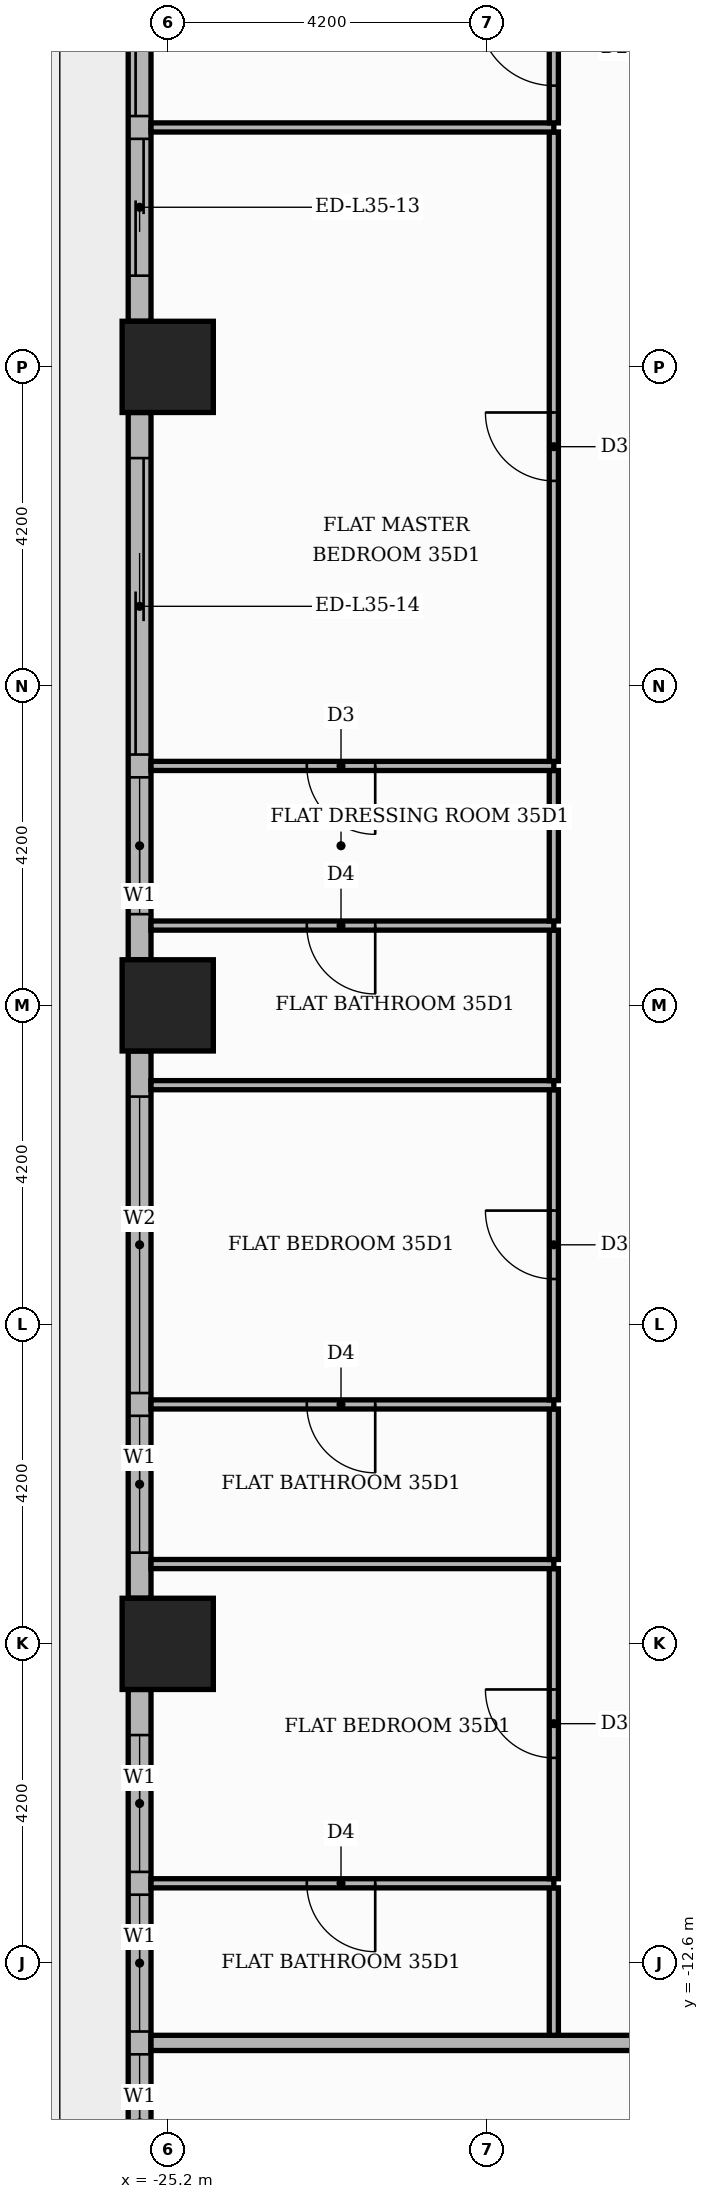
"""IFC4 building model, lengths in metres.
Left out: names, types, materials, properties, quantities, classifications, styles, units other than length and angle.
Written with IfcOpenShell. Run it as: python <this file> out.ifc"""

import sys

from ifc_helpers import new_model, si_unit, direction, frame, frame_2d, origin, origin_2d, place, context, subcontext, project, spatial, rectangle, extrude, element, fill, save


model = new_model("IFC4")
c1 = context("Model", 3, precision=1e-05, world=origin(), true_north=direction((0.0, 1.0)))
c2 = subcontext(c1, "Body", "Model", "MODEL_VIEW")
j1 = project(units=[si_unit("LENGTHUNIT", "METRE"), si_unit("PLANEANGLEUNIT", "RADIAN")], contexts=[c1])
p1 = place(None, origin())
s1 = spatial("IfcSite", under=j1, at=p1, CompositionType="ELEMENT")
p2 = place(p1, origin())
s2 = spatial("IfcBuilding", under=s1, at=p2, CompositionType="ELEMENT")
p3 = place(p2, frame((0.0, 0.0, 149.4)))
s3 = spatial("IfcBuildingStorey", under=s2, at=p3, CompositionType="ELEMENT", Elevation=149.4)
for number, where, z_axis, x_axis in (
    (1, (-25.2, 0.0, 0.0), (0.0, 0.0, 1.0), (1.0, 0.0, 0.0)),
    (2, (-25.2, -8.4, 0.0), (0.0, 0.0, 1.0), (1.0, 0.0, 0.0)),
    (3, (-25.2, 8.4, 0.0), (0.0, 0.0, 1.0), (1.0, 0.0, 0.0)),
):
    element("IfcColumn", number, at=place(p3, frame(where, z_axis=z_axis, x_axis=x_axis)), inside=s3, PredefinedType="COLUMN", context=c2, shape_type="SweptSolid", body=[
        extrude(rectangle(XDim=1.2, YDim=1.2, at=origin_2d()), origin(), (0.0, 0.0, 1.0), 3.9),
    ])
p4 = place(p3, frame((-25.57, 16.2, 0.0), z_axis=(0.0, 0.0, 1.0), x_axis=(0.0, -1.0, 0.0)))
e4 = element("IfcWall", 4, at=p4, inside=s3, PredefinedType="STANDARD", context=c2, shape_type="SweptSolid", body=[
    extrude(rectangle(XDim=7.2, YDim=0.3, at=frame_2d((3.6, 0.0))), origin(), (0.0, 0.0, 1.0), 3.48),
])
p5 = place(p4, frame((0.6, 0.0, 0.0)))
e5 = element("IfcOpeningElement", 5, at=p5, cuts=e4, PredefinedType="OPENING", context=c2, shape_type="SweptSolid", body=[
    extrude(rectangle(XDim=3.9, YDim=2.4, at=frame_2d((1.95, 1.2))), frame((0.0, 0.16, 0.0), z_axis=(0.0, -1.0, 0.0), x_axis=(1.0, 0.0, 0.0)), (0.0, 0.0, 1.0), 0.32),
])
p6 = place(p4, frame((4.8, 0.0, 0.0)))
e6 = element("IfcOpeningElement", 6, at=p6, cuts=e4, PredefinedType="OPENING", context=c2, shape_type="SweptSolid", body=[
    extrude(rectangle(XDim=1.8, YDim=2.4, at=frame_2d((0.9, 1.2))), frame((0.0, 0.16, 0.0), z_axis=(0.0, -1.0, 0.0), x_axis=(1.0, 0.0, 0.0)), (0.0, 0.0, 1.0), 0.32),
])
p7 = place(p3, frame((-25.57, 7.8, 0.0), z_axis=(0.0, 0.0, 1.0), x_axis=(0.0, -1.0, 0.0)))
e7 = element("IfcWall", 7, at=p7, inside=s3, PredefinedType="STANDARD", context=c2, shape_type="SweptSolid", body=[
    extrude(rectangle(XDim=7.2, YDim=0.3, at=frame_2d((3.6, 0.0))), origin(), (0.0, 0.0, 1.0), 3.48),
])
p8 = place(p7, frame((0.6, 0.0, 0.0)))
e8 = element("IfcOpeningElement", 8, at=p8, cuts=e7, PredefinedType="OPENING", context=c2, shape_type="SweptSolid", body=[
    extrude(rectangle(XDim=3.9, YDim=2.4, at=frame_2d((1.95, 1.2))), frame((0.0, 0.16, 0.0), z_axis=(0.0, -1.0, 0.0), x_axis=(1.0, 0.0, 0.0)), (0.0, 0.0, 1.0), 0.32),
])
p9 = place(p7, frame((4.8, 0.0, 0.9)))
e9 = element("IfcOpeningElement", 9, at=p9, cuts=e7, PredefinedType="OPENING", context=c2, shape_type="SweptSolid", body=[
    extrude(rectangle(XDim=1.8, YDim=2.1, at=frame_2d((0.9, 1.05))), frame((0.0, 0.16, 0.0), z_axis=(0.0, -1.0, 0.0), x_axis=(1.0, 0.0, 0.0)), (0.0, 0.0, 1.0), 0.32),
])
p10 = place(p3, frame((-25.57, -0.6, 0.0), z_axis=(0.0, 0.0, 1.0), x_axis=(0.0, -1.0, 0.0)))
e10 = element("IfcWall", 10, at=p10, inside=s3, PredefinedType="STANDARD", context=c2, shape_type="SweptSolid", body=[
    extrude(rectangle(XDim=7.2, YDim=0.3, at=frame_2d((3.6, 0.0))), origin(), (0.0, 0.0, 1.0), 3.48),
])
p11 = place(p10, frame((0.6, 0.0, 0.9)))
e11 = element("IfcOpeningElement", 11, at=p11, cuts=e10, PredefinedType="OPENING", context=c2, shape_type="SweptSolid", body=[
    extrude(rectangle(XDim=3.9, YDim=2.1, at=frame_2d((1.95, 1.05))), frame((0.0, 0.16, 0.0), z_axis=(0.0, -1.0, 0.0), x_axis=(1.0, 0.0, 0.0)), (0.0, 0.0, 1.0), 0.32),
])
p12 = place(p10, frame((4.8, 0.0, 0.9)))
e12 = element("IfcOpeningElement", 12, at=p12, cuts=e10, PredefinedType="OPENING", context=c2, shape_type="SweptSolid", body=[
    extrude(rectangle(XDim=1.8, YDim=2.1, at=frame_2d((0.9, 1.05))), frame((0.0, 0.16, 0.0), z_axis=(0.0, -1.0, 0.0), x_axis=(1.0, 0.0, 0.0)), (0.0, 0.0, 1.0), 0.32),
])
p13 = place(p3, frame((-25.57, -9.0, 0.0), z_axis=(0.0, 0.0, 1.0), x_axis=(0.0, -1.0, 0.0)))
e13 = element("IfcWall", 13, at=p13, inside=s3, PredefinedType="STANDARD", context=c2, shape_type="SweptSolid", body=[
    extrude(rectangle(XDim=7.2, YDim=0.3, at=frame_2d((3.6, 0.0))), origin(), (0.0, 0.0, 1.0), 3.48),
])
p14 = place(p13, frame((0.6, 0.0, 0.9)))
e14 = element("IfcOpeningElement", 14, at=p14, cuts=e13, PredefinedType="OPENING", context=c2, shape_type="SweptSolid", body=[
    extrude(rectangle(XDim=1.8, YDim=2.1, at=frame_2d((0.9, 1.05))), frame((0.0, 0.16, 0.0), z_axis=(0.0, -1.0, 0.0), x_axis=(1.0, 0.0, 0.0)), (0.0, 0.0, 1.0), 0.32),
])
p15 = place(p13, frame((2.7, 0.0, 0.9)))
e15 = element("IfcOpeningElement", 15, at=p15, cuts=e13, PredefinedType="OPENING", context=c2, shape_type="SweptSolid", body=[
    extrude(rectangle(XDim=1.8, YDim=2.1, at=frame_2d((0.9, 1.05))), frame((0.0, 0.16, 0.0), z_axis=(0.0, -1.0, 0.0), x_axis=(1.0, 0.0, 0.0)), (0.0, 0.0, 1.0), 0.32),
])
p16 = place(p13, frame((4.8, 0.0, 0.9)))
e16 = element("IfcOpeningElement", 16, at=p16, cuts=e13, PredefinedType="OPENING", context=c2, shape_type="SweptSolid", body=[
    extrude(rectangle(XDim=1.8, YDim=2.1, at=frame_2d((0.9, 1.05))), frame((0.0, 0.16, 0.0), z_axis=(0.0, -1.0, 0.0), x_axis=(1.0, 0.0, 0.0)), (0.0, 0.0, 1.0), 0.32),
])
p17 = place(p3, frame((-25.42, -13.65, 0.0), z_axis=(0.0, 0.0, 1.0), x_axis=(1.0, 0.0, 0.0)))
e17 = element("IfcWall", 17, at=p17, inside=s3, PredefinedType="PARTITIONING", context=c2, shape_type="SweptSolid", body=[
    extrude(rectangle(XDim=39.07, YDim=0.2, at=frame_2d((19.535, 0.0))), origin(), (0.0, 0.0, 1.0), 3.48),
])
p18 = place(p17, frame((14.37, 0.0, 0.0)))
e18 = element("IfcOpeningElement", 18, at=p18, cuts=e17, PredefinedType="OPENING", context=c2, shape_type="SweptSolid", body=[
    extrude(rectangle(XDim=1.1, YDim=2.4, at=frame_2d((0.55, 1.2))), frame((0.0, 0.11, 0.0), z_axis=(0.0, -1.0, 0.0), x_axis=(1.0, 0.0, 0.0)), (0.0, 0.0, 1.0), 0.22),
])
p19 = place(p3, frame((-20.12, -13.55, 0.0), z_axis=(0.0, 0.0, 1.0), x_axis=(0.0, 1.0, 0.0)))
e19 = element("IfcWall", 19, at=p19, inside=s3, PredefinedType="PARTITIONING", context=c2, shape_type="SweptSolid", body=[
    extrude(rectangle(XDim=1.94, YDim=0.12, at=frame_2d((0.97, 0.0))), origin(), (0.0, 0.0, 1.0), 3.48),
])
p20 = place(p3, frame((-25.42, -11.55, 0.0), z_axis=(0.0, 0.0, 1.0), x_axis=(1.0, 0.0, 0.0)))
e20 = element("IfcWall", 20, at=p20, inside=s3, PredefinedType="PARTITIONING", context=c2, shape_type="SweptSolid", body=[
    extrude(rectangle(XDim=5.3, YDim=0.12, at=frame_2d((2.65, 0.0))), origin(), (0.0, 0.0, 1.0), 3.48),
])
p21 = place(p20, frame((2.05, 0.0, 0.0)))
e21 = element("IfcOpeningElement", 21, at=p21, cuts=e20, PredefinedType="OPENING", context=c2, shape_type="SweptSolid", body=[
    extrude(rectangle(XDim=0.9, YDim=2.1, at=frame_2d((0.45, 1.05))), frame((0.0, 0.07, 0.0), z_axis=(0.0, -1.0, 0.0), x_axis=(1.0, 0.0, 0.0)), (0.0, 0.0, 1.0), 0.14),
])
p22 = place(p3, frame((-20.12, -11.49, 0.0), z_axis=(0.0, 0.0, 1.0), x_axis=(0.0, 1.0, 0.0)))
e22 = element("IfcWall", 22, at=p22, inside=s3, PredefinedType="PARTITIONING", context=c2, shape_type="SweptSolid", body=[
    extrude(rectangle(XDim=4.08, YDim=0.12, at=frame_2d((2.04, 0.0))), origin(), (0.0, 0.0, 1.0), 3.48),
])
p23 = place(p22, frame((1.59, 0.0, 0.0)))
e23 = element("IfcOpeningElement", 23, at=p23, cuts=e22, PredefinedType="OPENING", context=c2, shape_type="SweptSolid", body=[
    extrude(rectangle(XDim=0.9, YDim=2.1, at=frame_2d((0.45, 1.05))), frame((0.0, 0.07, 0.0), z_axis=(0.0, -1.0, 0.0), x_axis=(1.0, 0.0, 0.0)), (0.0, 0.0, 1.0), 0.14),
])
p24 = place(p3, frame((-25.42, -7.35, 0.0), z_axis=(0.0, 0.0, 1.0), x_axis=(1.0, 0.0, 0.0)))
e24 = element("IfcWall", 24, at=p24, inside=s3, PredefinedType="PARTITIONING", context=c2, shape_type="SweptSolid", body=[
    extrude(rectangle(XDim=5.3, YDim=0.12, at=frame_2d((2.65, 0.0))), origin(), (0.0, 0.0, 1.0), 3.48),
])
p25 = place(p3, frame((-20.12, -7.29, 0.0), z_axis=(0.0, 0.0, 1.0), x_axis=(0.0, 1.0, 0.0)))
e25 = element("IfcWall", 25, at=p25, inside=s3, PredefinedType="PARTITIONING", context=c2, shape_type="SweptSolid", body=[
    extrude(rectangle(XDim=1.98, YDim=0.12, at=frame_2d((0.99, 0.0))), origin(), (0.0, 0.0, 1.0), 3.48),
])
p26 = place(p3, frame((-25.42, -5.25, 0.0), z_axis=(0.0, 0.0, 1.0), x_axis=(1.0, 0.0, 0.0)))
e26 = element("IfcWall", 26, at=p26, inside=s3, PredefinedType="PARTITIONING", context=c2, shape_type="SweptSolid", body=[
    extrude(rectangle(XDim=5.3, YDim=0.12, at=frame_2d((2.65, 0.0))), origin(), (0.0, 0.0, 1.0), 3.48),
])
p27 = place(p26, frame((2.05, 0.0, 0.0)))
e27 = element("IfcOpeningElement", 27, at=p27, cuts=e26, PredefinedType="OPENING", context=c2, shape_type="SweptSolid", body=[
    extrude(rectangle(XDim=0.9, YDim=2.1, at=frame_2d((0.45, 1.05))), frame((0.0, 0.07, 0.0), z_axis=(0.0, -1.0, 0.0), x_axis=(1.0, 0.0, 0.0)), (0.0, 0.0, 1.0), 0.14),
])
p28 = place(p3, frame((-20.12, -5.19, 0.0), z_axis=(0.0, 0.0, 1.0), x_axis=(0.0, 1.0, 0.0)))
e28 = element("IfcWall", 28, at=p28, inside=s3, PredefinedType="PARTITIONING", context=c2, shape_type="SweptSolid", body=[
    extrude(rectangle(XDim=4.08, YDim=0.12, at=frame_2d((2.04, 0.0))), origin(), (0.0, 0.0, 1.0), 3.48),
])
p29 = place(p28, frame((1.59, 0.0, 0.0)))
e29 = element("IfcOpeningElement", 29, at=p29, cuts=e28, PredefinedType="OPENING", context=c2, shape_type="SweptSolid", body=[
    extrude(rectangle(XDim=0.9, YDim=2.1, at=frame_2d((0.45, 1.05))), frame((0.0, 0.07, 0.0), z_axis=(0.0, -1.0, 0.0), x_axis=(1.0, 0.0, 0.0)), (0.0, 0.0, 1.0), 0.14),
])
p30 = place(p3, frame((-25.42, -1.05, 0.0), z_axis=(0.0, 0.0, 1.0), x_axis=(1.0, 0.0, 0.0)))
e30 = element("IfcWall", 30, at=p30, inside=s3, PredefinedType="PARTITIONING", context=c2, shape_type="SweptSolid", body=[
    extrude(rectangle(XDim=5.3, YDim=0.12, at=frame_2d((2.65, 0.0))), origin(), (0.0, 0.0, 1.0), 3.48),
])
p31 = place(p3, frame((-20.12, -0.99, 0.0), z_axis=(0.0, 0.0, 1.0), x_axis=(0.0, 1.0, 0.0)))
e31 = element("IfcWall", 31, at=p31, inside=s3, PredefinedType="PARTITIONING", context=c2, shape_type="SweptSolid", body=[
    extrude(rectangle(XDim=1.98, YDim=0.12, at=frame_2d((0.99, 0.0))), origin(), (0.0, 0.0, 1.0), 3.48),
])
p32 = place(p3, frame((-25.42, 1.05, 0.0), z_axis=(0.0, 0.0, 1.0), x_axis=(1.0, 0.0, 0.0)))
e32 = element("IfcWall", 32, at=p32, inside=s3, PredefinedType="PARTITIONING", context=c2, shape_type="SweptSolid", body=[
    extrude(rectangle(XDim=5.3, YDim=0.12, at=frame_2d((2.65, 0.0))), origin(), (0.0, 0.0, 1.0), 3.48),
])
p33 = place(p32, frame((2.05, 0.0, 0.0)))
e33 = element("IfcOpeningElement", 33, at=p33, cuts=e32, PredefinedType="OPENING", context=c2, shape_type="SweptSolid", body=[
    extrude(rectangle(XDim=0.9, YDim=2.1, at=frame_2d((0.45, 1.05))), frame((0.0, 0.07, 0.0), z_axis=(0.0, -1.0, 0.0), x_axis=(1.0, 0.0, 0.0)), (0.0, 0.0, 1.0), 0.14),
])
p34 = place(p3, frame((-20.12, 1.11, 0.0), z_axis=(0.0, 0.0, 1.0), x_axis=(0.0, 1.0, 0.0)))
e34 = element("IfcWall", 34, at=p34, inside=s3, PredefinedType="PARTITIONING", context=c2, shape_type="SweptSolid", body=[
    extrude(rectangle(XDim=1.98, YDim=0.12, at=frame_2d((0.99, 0.0))), origin(), (0.0, 0.0, 1.0), 3.48),
])
p35 = place(p3, frame((-25.42, 3.15, 0.0), z_axis=(0.0, 0.0, 1.0), x_axis=(1.0, 0.0, 0.0)))
e35 = element("IfcWall", 35, at=p35, inside=s3, PredefinedType="PARTITIONING", context=c2, shape_type="SweptSolid", body=[
    extrude(rectangle(XDim=5.3, YDim=0.12, at=frame_2d((2.65, 0.0))), origin(), (0.0, 0.0, 1.0), 3.48),
])
p36 = place(p35, frame((2.05, 0.0, 0.0)))
e36 = element("IfcOpeningElement", 36, at=p36, cuts=e35, PredefinedType="OPENING", context=c2, shape_type="SweptSolid", body=[
    extrude(rectangle(XDim=0.9, YDim=2.1, at=frame_2d((0.45, 1.05))), frame((0.0, 0.07, 0.0), z_axis=(0.0, -1.0, 0.0), x_axis=(1.0, 0.0, 0.0)), (0.0, 0.0, 1.0), 0.14),
])
p37 = place(p3, frame((-20.12, 3.21, 0.0), z_axis=(0.0, 0.0, 1.0), x_axis=(0.0, 1.0, 0.0)))
e37 = element("IfcWall", 37, at=p37, inside=s3, PredefinedType="PARTITIONING", context=c2, shape_type="SweptSolid", body=[
    extrude(rectangle(XDim=8.28, YDim=0.12, at=frame_2d((4.14, 0.0))), origin(), (0.0, 0.0, 1.0), 3.48),
])
p38 = place(p37, frame((3.69, 0.0, 0.0)))
e38 = element("IfcOpeningElement", 38, at=p38, cuts=e37, PredefinedType="OPENING", context=c2, shape_type="SweptSolid", body=[
    extrude(rectangle(XDim=0.9, YDim=2.1, at=frame_2d((0.45, 1.05))), frame((0.0, 0.07, 0.0), z_axis=(0.0, -1.0, 0.0), x_axis=(1.0, 0.0, 0.0)), (0.0, 0.0, 1.0), 0.14),
])
p39 = place(p3, frame((-25.42, 11.55, 0.0), z_axis=(0.0, 0.0, 1.0), x_axis=(1.0, 0.0, 0.0)))
e39 = element("IfcWall", 39, at=p39, inside=s3, PredefinedType="PARTITIONING", context=c2, shape_type="SweptSolid", body=[
    extrude(rectangle(XDim=5.3, YDim=0.12, at=frame_2d((2.65, 0.0))), origin(), (0.0, 0.0, 1.0), 3.48),
])
p40 = place(p3, frame((-20.12, 11.61, 0.0), z_axis=(0.0, 0.0, 1.0), x_axis=(0.0, 1.0, 0.0)))
e40 = element("IfcWall", 40, at=p40, inside=s3, PredefinedType="PARTITIONING", context=c2, shape_type="SweptSolid", body=[
    extrude(rectangle(XDim=1.98, YDim=0.12, at=frame_2d((0.99, 0.0))), origin(), (0.0, 0.0, 1.0), 3.48),
])
p41 = place(p40, frame((0.49, 0.0, 0.0)))
e41 = element("IfcOpeningElement", 41, at=p41, cuts=e40, PredefinedType="OPENING", context=c2, shape_type="SweptSolid", body=[
    extrude(rectangle(XDim=1.0, YDim=2.1, at=frame_2d((0.5, 1.05))), frame((0.0, 0.07, 0.0), z_axis=(0.0, -1.0, 0.0), x_axis=(1.0, 0.0, 0.0)), (0.0, 0.0, 1.0), 0.14),
])
p42 = place(p5, origin())
e42 = element("IfcDoor", 42, at=p42, inside=s3, OperationType="SLIDING_TO_LEFT", PredefinedType="DOOR", context=c2, shape_type="SweptSolid", body=[
    extrude(rectangle(XDim=3.9, YDim=2.4, at=frame_2d((1.95, 1.2))), frame((0.0, 0.025, 0.0), z_axis=(0.0, -1.0, 0.0), x_axis=(1.0, 0.0, 0.0)), (0.0, 0.0, 1.0), 0.05),
])
fill(e5, e42)
p43 = place(p6, origin())
e43 = element("IfcDoor", 43, at=p43, inside=s3, OperationType="SLIDING_TO_RIGHT", PredefinedType="DOOR", context=c2, shape_type="SweptSolid", body=[
    extrude(rectangle(XDim=1.8, YDim=2.4, at=frame_2d((0.9, 1.2))), frame((0.0, 0.025, 0.0), z_axis=(0.0, -1.0, 0.0), x_axis=(1.0, 0.0, 0.0)), (0.0, 0.0, 1.0), 0.05),
])
fill(e6, e43)
p44 = place(p8, origin())
e44 = element("IfcDoor", 44, at=p44, inside=s3, OperationType="SLIDING_TO_LEFT", PredefinedType="DOOR", context=c2, shape_type="SweptSolid", body=[
    extrude(rectangle(XDim=3.9, YDim=2.4, at=frame_2d((1.95, 1.2))), frame((0.0, 0.025, 0.0), z_axis=(0.0, -1.0, 0.0), x_axis=(1.0, 0.0, 0.0)), (0.0, 0.0, 1.0), 0.05),
])
fill(e8, e44)
p45 = place(p9, origin())
e45 = element("IfcWindow", 45, at=p45, inside=s3, PartitioningType="SINGLE_PANEL", PredefinedType="WINDOW", context=c2, shape_type="SweptSolid", body=[
    extrude(rectangle(XDim=1.8, YDim=2.1, at=frame_2d((0.9, 1.05))), frame((0.0, 0.03, 0.0), z_axis=(0.0, -1.0, 0.0), x_axis=(1.0, 0.0, 0.0)), (0.0, 0.0, 1.0), 0.06),
])
fill(e9, e45)
p46 = place(p11, origin())
e46 = element("IfcWindow", 46, at=p46, inside=s3, PartitioningType="SINGLE_PANEL", PredefinedType="WINDOW", context=c2, shape_type="SweptSolid", body=[
    extrude(rectangle(XDim=3.9, YDim=2.1, at=frame_2d((1.95, 1.05))), frame((0.0, 0.03, 0.0), z_axis=(0.0, -1.0, 0.0), x_axis=(1.0, 0.0, 0.0)), (0.0, 0.0, 1.0), 0.06),
])
fill(e11, e46)
p47 = place(p12, origin())
e47 = element("IfcWindow", 47, at=p47, inside=s3, PartitioningType="SINGLE_PANEL", PredefinedType="WINDOW", context=c2, shape_type="SweptSolid", body=[
    extrude(rectangle(XDim=1.8, YDim=2.1, at=frame_2d((0.9, 1.05))), frame((0.0, 0.03, 0.0), z_axis=(0.0, -1.0, 0.0), x_axis=(1.0, 0.0, 0.0)), (0.0, 0.0, 1.0), 0.06),
])
fill(e12, e47)
p48 = place(p14, origin())
e48 = element("IfcWindow", 48, at=p48, inside=s3, PartitioningType="SINGLE_PANEL", PredefinedType="WINDOW", context=c2, shape_type="SweptSolid", body=[
    extrude(rectangle(XDim=1.8, YDim=2.1, at=frame_2d((0.9, 1.05))), frame((0.0, 0.03, 0.0), z_axis=(0.0, -1.0, 0.0), x_axis=(1.0, 0.0, 0.0)), (0.0, 0.0, 1.0), 0.06),
])
fill(e14, e48)
p49 = place(p15, origin())
e49 = element("IfcWindow", 49, at=p49, inside=s3, PartitioningType="SINGLE_PANEL", PredefinedType="WINDOW", context=c2, shape_type="SweptSolid", body=[
    extrude(rectangle(XDim=1.8, YDim=2.1, at=frame_2d((0.9, 1.05))), frame((0.0, 0.03, 0.0), z_axis=(0.0, -1.0, 0.0), x_axis=(1.0, 0.0, 0.0)), (0.0, 0.0, 1.0), 0.06),
])
fill(e15, e49)
p50 = place(p16, origin())
e50 = element("IfcWindow", 50, at=p50, inside=s3, PartitioningType="SINGLE_PANEL", PredefinedType="WINDOW", context=c2, shape_type="SweptSolid", body=[
    extrude(rectangle(XDim=1.8, YDim=2.1, at=frame_2d((0.9, 1.05))), frame((0.0, 0.03, 0.0), z_axis=(0.0, -1.0, 0.0), x_axis=(1.0, 0.0, 0.0)), (0.0, 0.0, 1.0), 0.06),
])
fill(e16, e50)
p51 = place(p41, origin())
e51 = element("IfcDoor", 51, at=p51, inside=s3, OperationType="SINGLE_SWING_RIGHT", PredefinedType="DOOR", context=c2, shape_type="SweptSolid", body=[
    extrude(rectangle(XDim=1.0, YDim=2.1, at=frame_2d((0.5, 1.05))), frame((0.0, 0.025, 0.0), z_axis=(0.0, -1.0, 0.0), x_axis=(1.0, 0.0, 0.0)), (0.0, 0.0, 1.0), 0.05),
])
fill(e41, e51)
p52 = place(p38, origin())
e52 = element("IfcDoor", 52, at=p52, inside=s3, OperationType="SINGLE_SWING_RIGHT", PredefinedType="DOOR", context=c2, shape_type="SweptSolid", body=[
    extrude(rectangle(XDim=0.9, YDim=2.1, at=frame_2d((0.45, 1.05))), frame((0.0, 0.025, 0.0), z_axis=(0.0, -1.0, 0.0), x_axis=(1.0, 0.0, 0.0)), (0.0, 0.0, 1.0), 0.05),
])
fill(e38, e52)
p53 = place(p36, frame((0.9, 0.0, 0.0), z_axis=(0.0, 0.0, 1.0), x_axis=(-1.0, 0.0, 0.0)))
e53 = element("IfcDoor", 53, at=p53, inside=s3, OperationType="SINGLE_SWING_RIGHT", PredefinedType="DOOR", context=c2, shape_type="SweptSolid", body=[
    extrude(rectangle(XDim=0.9, YDim=2.1, at=frame_2d((0.45, 1.05))), frame((0.0, 0.025, 0.0), z_axis=(0.0, -1.0, 0.0), x_axis=(1.0, 0.0, 0.0)), (0.0, 0.0, 1.0), 0.05),
])
fill(e36, e53)
p54 = place(p33, frame((0.9, 0.0, 0.0), z_axis=(0.0, 0.0, 1.0), x_axis=(-1.0, 0.0, 0.0)))
e54 = element("IfcDoor", 54, at=p54, inside=s3, OperationType="SINGLE_SWING_RIGHT", PredefinedType="DOOR", context=c2, shape_type="SweptSolid", body=[
    extrude(rectangle(XDim=0.9, YDim=2.1, at=frame_2d((0.45, 1.05))), frame((0.0, 0.025, 0.0), z_axis=(0.0, -1.0, 0.0), x_axis=(1.0, 0.0, 0.0)), (0.0, 0.0, 1.0), 0.05),
])
fill(e33, e54)
p55 = place(p29, origin())
e55 = element("IfcDoor", 55, at=p55, inside=s3, OperationType="SINGLE_SWING_RIGHT", PredefinedType="DOOR", context=c2, shape_type="SweptSolid", body=[
    extrude(rectangle(XDim=0.9, YDim=2.1, at=frame_2d((0.45, 1.05))), frame((0.0, 0.025, 0.0), z_axis=(0.0, -1.0, 0.0), x_axis=(1.0, 0.0, 0.0)), (0.0, 0.0, 1.0), 0.05),
])
fill(e29, e55)
p56 = place(p27, frame((0.9, 0.0, 0.0), z_axis=(0.0, 0.0, 1.0), x_axis=(-1.0, 0.0, 0.0)))
e56 = element("IfcDoor", 56, at=p56, inside=s3, OperationType="SINGLE_SWING_RIGHT", PredefinedType="DOOR", context=c2, shape_type="SweptSolid", body=[
    extrude(rectangle(XDim=0.9, YDim=2.1, at=frame_2d((0.45, 1.05))), frame((0.0, 0.025, 0.0), z_axis=(0.0, -1.0, 0.0), x_axis=(1.0, 0.0, 0.0)), (0.0, 0.0, 1.0), 0.05),
])
fill(e27, e56)
p57 = place(p23, origin())
e57 = element("IfcDoor", 57, at=p57, inside=s3, OperationType="SINGLE_SWING_RIGHT", PredefinedType="DOOR", context=c2, shape_type="SweptSolid", body=[
    extrude(rectangle(XDim=0.9, YDim=2.1, at=frame_2d((0.45, 1.05))), frame((0.0, 0.025, 0.0), z_axis=(0.0, -1.0, 0.0), x_axis=(1.0, 0.0, 0.0)), (0.0, 0.0, 1.0), 0.05),
])
fill(e23, e57)
p58 = place(p21, frame((0.9, 0.0, 0.0), z_axis=(0.0, 0.0, 1.0), x_axis=(-1.0, 0.0, 0.0)))
e58 = element("IfcDoor", 58, at=p58, inside=s3, OperationType="SINGLE_SWING_RIGHT", PredefinedType="DOOR", context=c2, shape_type="SweptSolid", body=[
    extrude(rectangle(XDim=0.9, YDim=2.1, at=frame_2d((0.45, 1.05))), frame((0.0, 0.025, 0.0), z_axis=(0.0, -1.0, 0.0), x_axis=(1.0, 0.0, 0.0)), (0.0, 0.0, 1.0), 0.05),
])
fill(e21, e58)
save(model, sys.argv[1])
